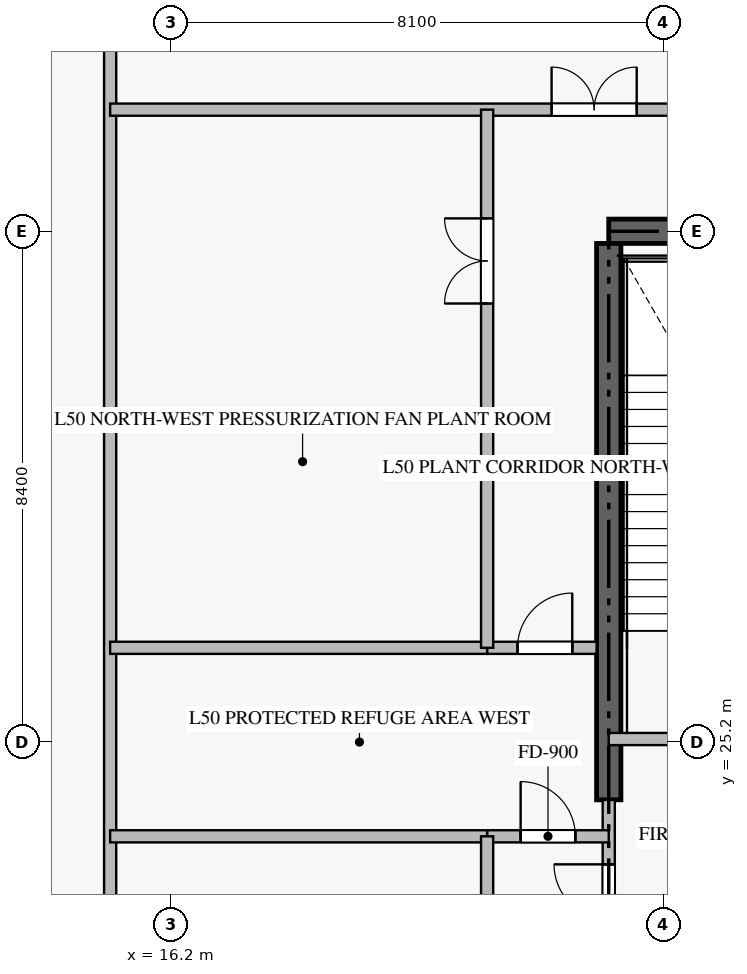
"""IFC4 building model, lengths in metres.
Left out: names, types, materials, properties, quantities, classifications, styles, units other than length and angle.
Written with IfcOpenShell. Run it as: python <this file> out.ifc"""

import sys

from ifc_helpers import new_model, si_unit, direction, frame, frame_2d, origin, place, context, subcontext, project, spatial, rectangle, extrude, source, transform, mapped, element, fill, save


model = new_model("IFC4")
c1 = context("Model", 3, precision=1e-05, world=origin(), true_north=direction((0.0, 1.0)))
c2 = subcontext(c1, "Body", "Model", "MODEL_VIEW")
j1 = project(units=[si_unit("LENGTHUNIT", "METRE"), si_unit("PLANEANGLEUNIT", "RADIAN")], contexts=[c1])
p1 = place(None, origin())
s1 = spatial("IfcSite", under=j1, at=p1, CompositionType="ELEMENT")
p2 = place(p1, origin())
s2 = spatial("IfcBuilding", under=s1, at=p2, CompositionType="ELEMENT")
p3 = place(p2, frame((0.0, 0.0, 198.9)))
s3 = spatial("IfcBuildingStorey", under=s2, at=p3, CompositionType="ELEMENT", Elevation=198.9)
p4 = place(p3, frame((41.4, 33.6, -0.44), z_axis=(0.0, 0.0, 1.0), x_axis=(-1.0, 0.0, 0.0)))
e1 = element("IfcWall", 1, at=p4, inside=s3, PredefinedType="SHEAR", context=c2, shape_type="SweptSolid", body=[
    extrude(rectangle(XDim=18.0, YDim=0.4, at=frame_2d((9.0, 0.0))), origin(), (0.0, 0.0, 1.0), 6.078),
])
p5 = place(p3, frame((23.4, 24.25, -0.44), z_axis=(0.0, 0.0, 1.0), x_axis=(0.0, 1.0, 0.0)))
e2 = element("IfcWall", 2, at=p5, inside=s3, PredefinedType="SHEAR", context=c2, shape_type="SweptSolid", body=[
    extrude(rectangle(XDim=9.15, YDim=0.4, at=frame_2d((4.575, 0.0))), origin(), (0.0, 0.0, 1.0), 6.078),
])
p6 = place(p3, frame((23.4, 25.25, 0.0), z_axis=(0.0, 0.0, 1.0), x_axis=(1.0, 0.0, 0.0)))
e3 = element("IfcWall", 3, at=p6, inside=s3, PredefinedType="STANDARD", context=c2, shape_type="SweptSolid", body=[
    extrude(rectangle(XDim=4.45, YDim=0.2, at=frame_2d((2.225, 0.0))), origin(), (0.0, 0.0, 1.0), 5.64),
])
p7 = place(p6, frame((1.65, 0.0, 0.0)))
e4 = element("IfcOpeningElement", 4, at=p7, cuts=e3, PredefinedType="OPENING", context=c2, shape_type="SweptSolid", body=[
    extrude(rectangle(XDim=1.1, YDim=2.15, at=frame_2d((0.55, 1.075))), frame((0.0, 0.11, 0.0), z_axis=(0.0, -1.0, 0.0), x_axis=(1.0, 0.0, 0.0)), (0.0, 0.0, 1.0), 0.22),
])
p8 = place(p3, frame((23.4, 21.852, 0.0), z_axis=(0.0, 0.0, 1.0), x_axis=(0.0, 1.0, 0.0)))
e5 = element("IfcWall", 5, at=p8, inside=s3, PredefinedType="STANDARD", context=c2, shape_type="SweptSolid", body=[
    extrude(rectangle(XDim=2.396, YDim=0.2, at=frame_2d((1.198, 0.0))), origin(), (0.0, 0.0, 1.0), 5.64),
])
p9 = place(p8, frame((0.437, 0.0, 0.0)))
e6 = element("IfcOpeningElement", 6, at=p9, cuts=e5, PredefinedType="OPENING", context=c2, shape_type="SweptSolid", body=[
    extrude(rectangle(XDim=0.9, YDim=2.1, at=frame_2d((0.45, 1.05))), frame((0.0, 0.11, 0.0), z_axis=(0.0, -1.0, 0.0), x_axis=(1.0, 0.0, 0.0)), (0.0, 0.0, 1.0), 0.22),
])
p10 = place(p3, frame((15.2, 9.0, 0.0), z_axis=(0.0, 0.0, 1.0), x_axis=(0.0, 1.0, 0.0)))
e7 = element("IfcWall", 7, at=p10, inside=s3, PredefinedType="STANDARD", context=c2, shape_type="SweptSolid", body=[
    extrude(rectangle(XDim=32.4, YDim=0.2, at=frame_2d((16.2, 0.0))), origin(), (0.0, 0.0, 1.0), 5.64),
])
p11 = place(p3, frame((15.2, 23.65, 0.0), z_axis=(0.0, 0.0, 1.0), x_axis=(1.0, 0.0, 0.0)))
e8 = element("IfcWall", 8, at=p11, inside=s3, PredefinedType="STANDARD", context=c2, shape_type="SweptSolid", body=[
    extrude(rectangle(XDim=6.2, YDim=0.2, at=frame_2d((3.1, 0.0))), origin(), (0.0, 0.0, 1.0), 5.64),
])
p12 = place(p3, frame((21.402, 23.65, 0.0), z_axis=(0.0, 0.0, 1.0), x_axis=(1.0, 0.0, 0.0)))
e9 = element("IfcWall", 9, at=p12, inside=s3, PredefinedType="STANDARD", context=c2, shape_type="SweptSolid", body=[
    extrude(rectangle(XDim=1.998, YDim=0.2, at=frame_2d((0.999, 0.0))), origin(), (0.0, 0.0, 1.0), 5.64),
])
p13 = place(p12, frame((0.549, 0.0, 0.0)))
e10 = element("IfcOpeningElement", 10, at=p13, cuts=e9, PredefinedType="OPENING", context=c2, shape_type="SweptSolid", body=[
    extrude(rectangle(XDim=0.9, YDim=2.1, at=frame_2d((0.45, 1.05))), frame((0.0, 0.11, 0.0), z_axis=(0.0, -1.0, 0.0), x_axis=(1.0, 0.0, 0.0)), (0.0, 0.0, 1.0), 0.22),
])
p14 = place(p3, frame((15.2, 26.75, 0.0), z_axis=(0.0, 0.0, 1.0), x_axis=(1.0, 0.0, 0.0)))
e11 = element("IfcWall", 11, at=p14, inside=s3, PredefinedType="STANDARD", context=c2, shape_type="SweptSolid", body=[
    extrude(rectangle(XDim=6.2, YDim=0.2, at=frame_2d((3.1, 0.0))), origin(), (0.0, 0.0, 1.0), 5.64),
])
p15 = place(p3, frame((21.402, 26.75, 0.0), z_axis=(0.0, 0.0, 1.0), x_axis=(1.0, 0.0, 0.0)))
e12 = element("IfcWall", 12, at=p15, inside=s3, PredefinedType="STANDARD", context=c2, shape_type="SweptSolid", body=[
    extrude(rectangle(XDim=1.798, YDim=0.2, at=frame_2d((0.899, 0.0))), origin(), (0.0, 0.0, 1.0), 5.64),
])
p16 = place(p15, frame((0.498, 0.0, 0.0)))
e13 = element("IfcOpeningElement", 13, at=p16, cuts=e12, PredefinedType="OPENING", context=c2, shape_type="SweptSolid", body=[
    extrude(rectangle(XDim=0.9, YDim=2.1, at=frame_2d((0.45, 1.05))), frame((0.0, 0.11, 0.0), z_axis=(0.0, -1.0, 0.0), x_axis=(1.0, 0.0, 0.0)), (0.0, 0.0, 1.0), 0.22),
])
p17 = place(p3, frame((15.2, 35.6, 0.0), z_axis=(0.0, 0.0, 1.0), x_axis=(1.0, 0.0, 0.0)))
e14 = element("IfcWall", 14, at=p17, inside=s3, PredefinedType="STANDARD", context=c2, shape_type="SweptSolid", body=[
    extrude(rectangle(XDim=34.4, YDim=0.2, at=frame_2d((17.2, 0.0))), origin(), (0.0, 0.0, 1.0), 5.64),
])
p18 = place(p17, frame((7.26, 0.0, 0.0)))
e15 = element("IfcOpeningElement", 15, at=p18, cuts=e14, PredefinedType="OPENING", context=c2, shape_type="SweptSolid", body=[
    extrude(rectangle(XDim=1.4, YDim=2.2, at=frame_2d((0.7, 1.1))), frame((0.0, 0.11, 0.0), z_axis=(0.0, -1.0, 0.0), x_axis=(1.0, 0.0, 0.0)), (0.0, 0.0, 1.0), 0.22),
])
p19 = place(p17, frame((25.74, 0.0, 0.0)))
e16 = element("IfcOpeningElement", 16, at=p19, cuts=e14, PredefinedType="OPENING", context=c2, shape_type="SweptSolid", body=[
    extrude(rectangle(XDim=1.4, YDim=2.2, at=frame_2d((0.7, 1.1))), frame((0.0, 0.11, 0.0), z_axis=(0.0, -1.0, 0.0), x_axis=(1.0, 0.0, 0.0)), (0.0, 0.0, 1.0), 0.22),
])
p20 = place(p3, frame((21.4, 14.8, 0.0), z_axis=(0.0, 0.0, 1.0), x_axis=(0.0, 1.0, 0.0)))
e17 = element("IfcWall", 17, at=p20, inside=s3, PredefinedType="STANDARD", context=c2, shape_type="SweptSolid", body=[
    extrude(rectangle(XDim=8.85, YDim=0.2, at=frame_2d((4.425, 0.0))), origin(), (0.0, 0.0, 1.0), 5.64),
])
p21 = place(p20, frame((1.788, 0.0, 0.0)))
e18 = element("IfcOpeningElement", 18, at=p21, cuts=e17, PredefinedType="OPENING", context=c2, shape_type="SweptSolid", body=[
    extrude(rectangle(XDim=1.4, YDim=2.2, at=frame_2d((0.7, 1.1))), frame((0.0, 0.11, 0.0), z_axis=(0.0, -1.0, 0.0), x_axis=(1.0, 0.0, 0.0)), (0.0, 0.0, 1.0), 0.22),
])
p22 = place(p3, frame((21.4, 26.75, 0.0), z_axis=(0.0, 0.0, 1.0), x_axis=(0.0, 1.0, 0.0)))
e19 = element("IfcWall", 19, at=p22, inside=s3, PredefinedType="STANDARD", context=c2, shape_type="SweptSolid", body=[
    extrude(rectangle(XDim=8.85, YDim=0.2, at=frame_2d((4.425, 0.0))), origin(), (0.0, 0.0, 1.0), 5.64),
])
p23 = place(p22, frame((5.662, 0.0, 0.0)))
e20 = element("IfcOpeningElement", 20, at=p23, cuts=e19, PredefinedType="OPENING", context=c2, shape_type="SweptSolid", body=[
    extrude(rectangle(XDim=1.4, YDim=2.2, at=frame_2d((0.7, 1.1))), frame((0.0, 0.11, 0.0), z_axis=(0.0, -1.0, 0.0), x_axis=(1.0, 0.0, 0.0)), (0.0, 0.0, 1.0), 0.22),
])
m1 = source(origin(), c2, "Body", "SweptSolid", [
    extrude(rectangle(XDim=0.9, YDim=2.1, at=frame_2d((0.45, 1.05))), frame((0.0, 0.025, 0.0), z_axis=(0.0, -1.0, 0.0), x_axis=(1.0, 0.0, 0.0)), (0.0, 0.0, 1.0), 0.05),
])
p24 = place(p9, origin())
e21 = element("IfcDoor", 21, at=p24, inside=s3, OperationType="SINGLE_SWING_RIGHT", PredefinedType="DOOR", context=c2, shape_type="MappedRepresentation", body=[
    mapped(m1, transform((0.0, 0.0, 0.0), scale=1.0)),
])
fill(e6, e21)
p25 = place(p13, origin())
e22 = element("IfcDoor", 22, at=p25, inside=s3, OperationType="SINGLE_SWING_LEFT", PredefinedType="DOOR", context=c2, shape_type="MappedRepresentation", body=[
    mapped(m1, transform((0.0, 0.0, 0.0), scale=1.0)),
])
fill(e10, e22)
p26 = place(p16, origin())
e23 = element("IfcDoor", 23, at=p26, inside=s3, OperationType="SINGLE_SWING_RIGHT", PredefinedType="DOOR", context=c2, shape_type="MappedRepresentation", body=[
    mapped(m1, transform((0.0, 0.0, 0.0), scale=1.0)),
])
fill(e13, e23)
m2 = source(origin(), c2, "Body", "SweptSolid", [
    extrude(rectangle(XDim=1.4, YDim=2.2, at=frame_2d((0.7, 1.1))), frame((0.0, 0.025, 0.0), z_axis=(0.0, -1.0, 0.0), x_axis=(1.0, 0.0, 0.0)), (0.0, 0.0, 1.0), 0.05),
])
p27 = place(p18, origin())
e24 = element("IfcDoor", 24, at=p27, inside=s3, OperationType="DOUBLE_DOOR_SINGLE_SWING", PredefinedType="DOOR", context=c2, shape_type="MappedRepresentation", body=[
    mapped(m2, transform((0.0, 0.0, 0.0), scale=1.0)),
])
fill(e15, e24)
p28 = place(p23, origin())
e25 = element("IfcDoor", 25, at=p28, inside=s3, OperationType="DOUBLE_DOOR_SINGLE_SWING", PredefinedType="DOOR", context=c2, shape_type="MappedRepresentation", body=[
    mapped(m2, transform((0.0, 0.0, 0.0), scale=1.0)),
])
fill(e20, e25)
save(model, sys.argv[1])
